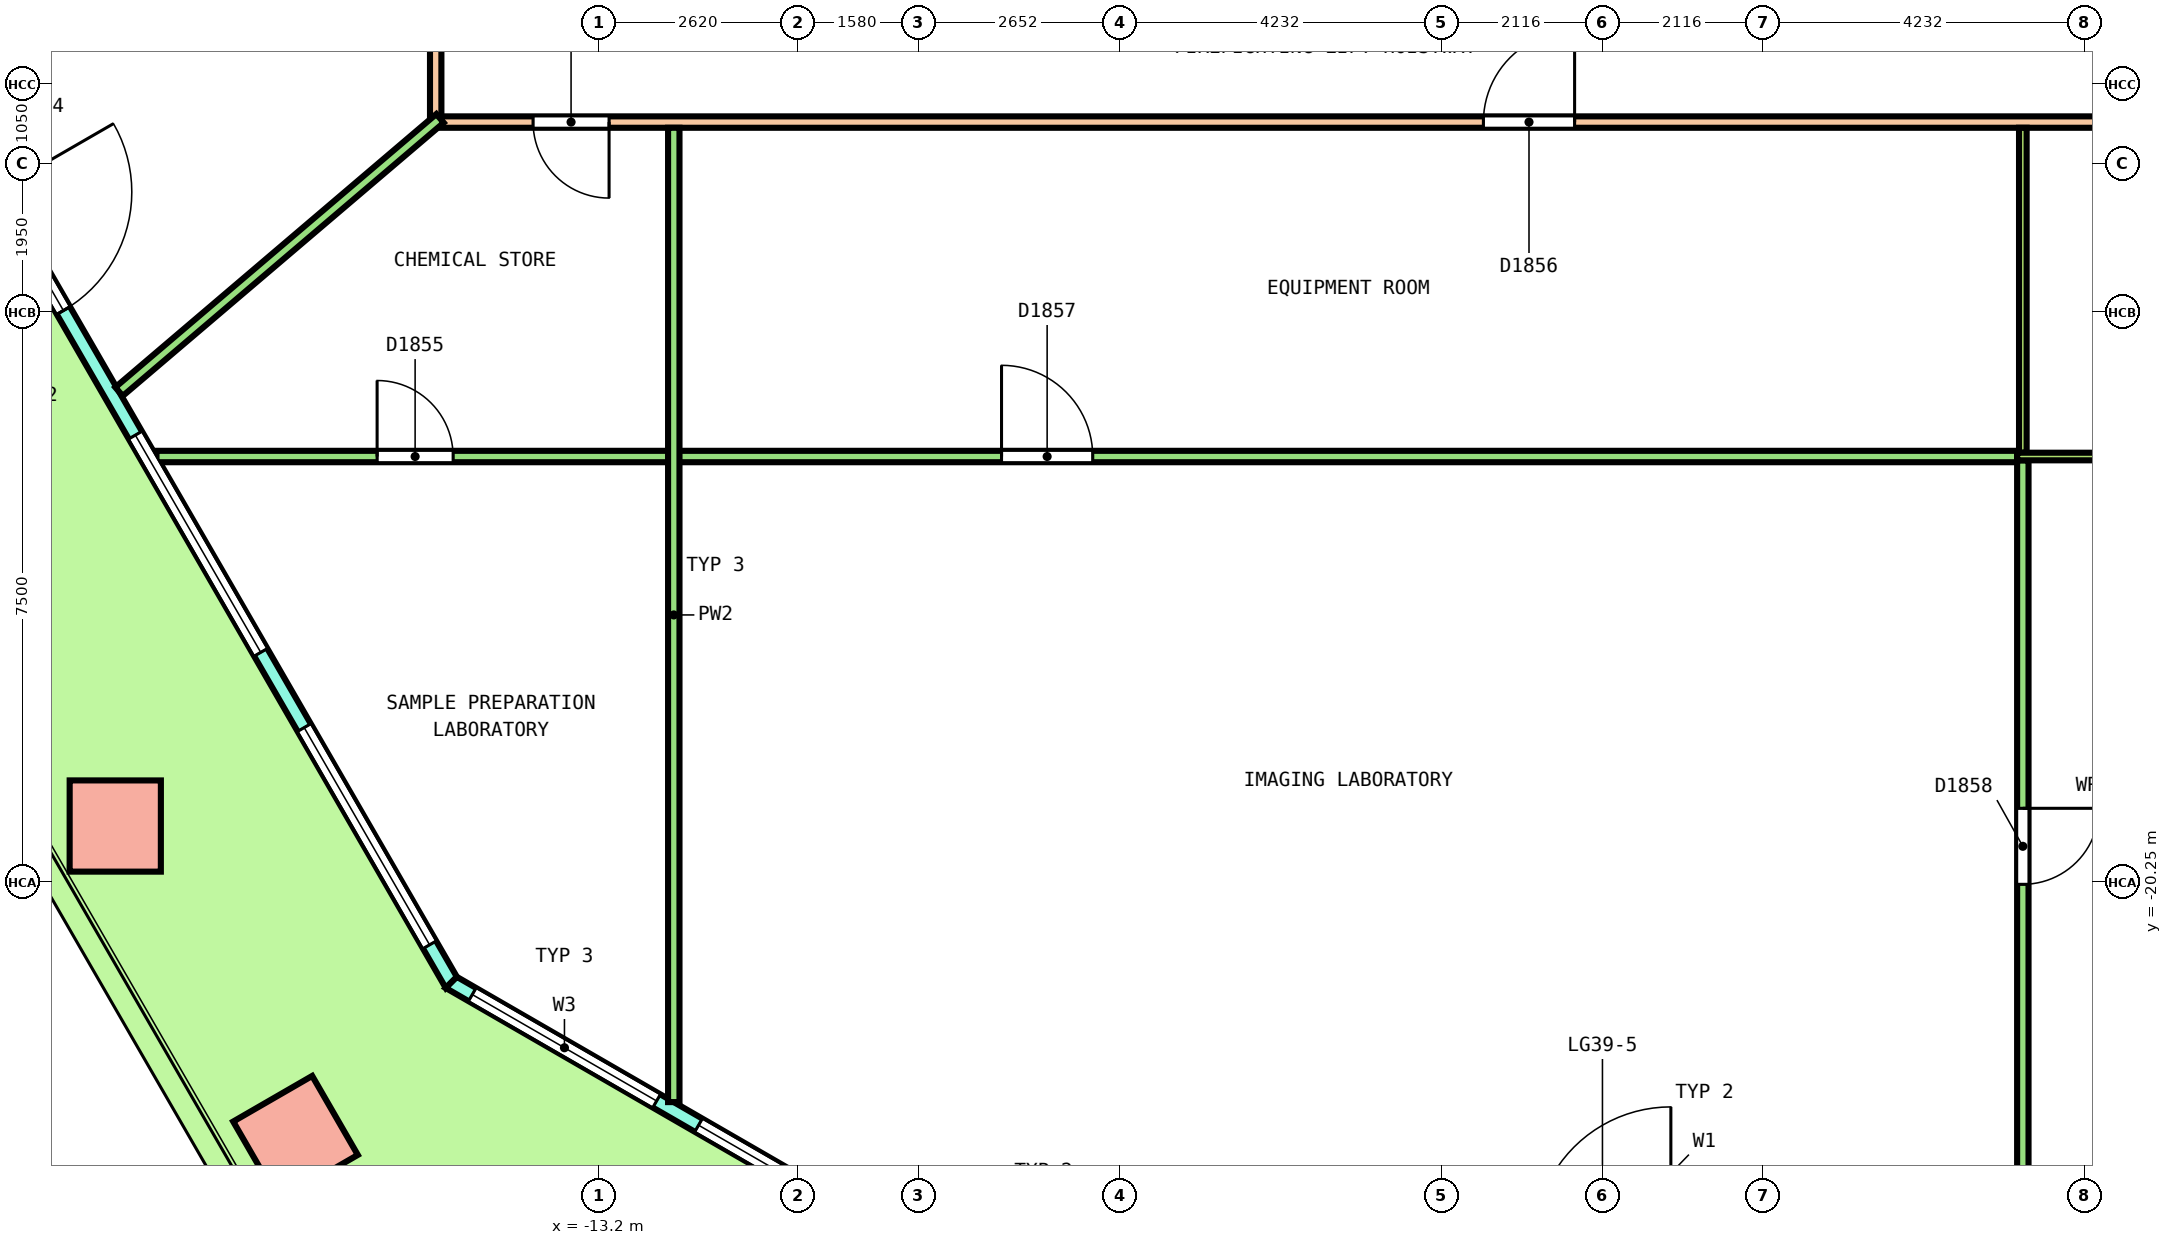
"""IFC4 building model, lengths in metres.
Left out: names, types, materials, properties, quantities, classifications, styles, units other than length and angle.
Written with IfcOpenShell. Run it as: python <this file> out.ifc"""

import sys

from ifc_helpers import new_model, si_unit, direction, frame, frame_2d, origin, origin_2d, place, context, subcontext, project, spatial, polyline, rectangle, outline, extrude, element, fill, save


model = new_model("IFC4")
c1 = context("Model", 3, precision=1e-05, world=origin(), true_north=direction((0.0, 1.0)))
c2 = subcontext(c1, "Body", "Model", "MODEL_VIEW")
j1 = project(units=[si_unit("LENGTHUNIT", "METRE"), si_unit("PLANEANGLEUNIT", "RADIAN")], contexts=[c1])
p1 = place(None, origin())
s1 = spatial("IfcSite", under=j1, at=p1, CompositionType="ELEMENT")
p2 = place(p1, origin())
s2 = spatial("IfcBuilding", under=s1, at=p2, CompositionType="ELEMENT")
p3 = place(p2, frame((0.0, 0.0, 180.4)))
s3 = spatial("IfcBuildingStorey", under=s2, at=p3, CompositionType="ELEMENT", Elevation=180.4)
p4 = place(p3, frame((-19.566, -19.511, 0.0), z_axis=(0.010908266268, -0.018803199313, 0.999763696792), x_axis=(0.501388074159, -0.864949390756, -0.021738227219)))
e1 = element("IfcColumn", 1, at=p4, inside=s3, PredefinedType="COLUMN", context=c2, shape_type="SweptSolid", body=[
    extrude(rectangle(XDim=1.2, YDim=1.2, at=origin_2d()), origin(), (0.0, 0.0, 1.0), 4.051),
])
p5 = place(p3, frame((-17.194, -23.619, 0.0), z_axis=(0.018132630042, -0.031385715123, 0.999342856388), x_axis=(0.865884970752, -0.499257274245, -0.031390946777)))
e2 = element("IfcColumn", 2, at=p5, inside=s3, PredefinedType="COLUMN", context=c2, shape_type="SweptSolid", body=[
    extrude(rectangle(XDim=1.2, YDim=1.2, at=origin_2d()), origin(), (0.0, 0.0, 1.0), 4.053),
])
p6 = place(p3, frame((-26.251, -2.331, 0.0), z_axis=(0.0, 0.0, 1.0), x_axis=(0.499999616612, -0.866025625133, 0.0)))
e3 = element("IfcWall", 3, at=p6, inside=s3, PredefinedType="SOLIDWALL", context=c2, shape_type="SweptSolid", body=[
    extrude(outline(polyline([(-0.027, -0.1), (0.985, -0.1), (1.998, -0.1), (3.01, -0.1), (4.022, -0.1), (5.034, -0.1), (6.046, -0.1), (7.058, -0.1), (8.071, -0.1), (9.083, -0.1), (10.095, -0.1), (11.107, -0.1), (12.119, -0.1), (13.131, -0.1), (14.143, -0.1), (15.156, -0.1), (16.168, -0.1), (17.18, -0.1), (18.192, -0.1), (19.204, -0.1), (20.216, -0.1), (21.229, -0.1), (22.241, -0.1), (22.187, 0.1), (21.18, 0.1), (20.172, 0.1), (19.165, 0.1), (18.158, 0.1), (17.151, 0.1), (16.143, 0.1), (15.136, 0.1), (14.129, 0.1), (13.122, 0.1), (12.114, 0.1), (11.107, 0.1), (10.1, 0.1), (9.092, 0.1), (8.085, 0.1), (7.078, 0.1), (6.071, 0.1), (5.063, 0.1), (4.056, 0.1), (3.049, 0.1), (2.042, 0.1), (1.034, 0.1), (0.027, 0.1), (-0.027, -0.1)])), origin(), (0.0, 0.0, 1.0), 4.1),
])
p7 = place(p6, frame((0.571, 0.0, 0.1)))
e4 = element("IfcOpeningElement", 4, at=p7, cuts=e3, PredefinedType="OPENING", context=c2, shape_type="SweptSolid", body=[
    extrude(rectangle(XDim=3.3, YDim=2.9, at=frame_2d((1.65, 1.45))), frame((0.0, 0.11, 0.0), z_axis=(0.0, -1.0, 0.0), x_axis=(1.0, 0.0, 0.0)), (0.0, 0.0, 1.0), 0.22),
])
p8 = place(p6, frame((5.014, 0.0, 0.1)))
e5 = element("IfcOpeningElement", 5, at=p8, cuts=e3, PredefinedType="OPENING", context=c2, shape_type="SweptSolid", body=[
    extrude(rectangle(XDim=3.3, YDim=2.9, at=frame_2d((1.65, 1.45))), frame((0.0, 0.11, 0.0), z_axis=(0.0, -1.0, 0.0), x_axis=(1.0, 0.0, 0.0)), (0.0, 0.0, 1.0), 0.22),
])
p9 = place(p6, frame((10.207, 0.0, 0.0)))
e6 = element("IfcOpeningElement", 6, at=p9, cuts=e3, PredefinedType="OPENING", context=c2, shape_type="SweptSolid", body=[
    extrude(rectangle(XDim=1.8, YDim=2.4, at=frame_2d((0.9, 1.2))), frame((0.0, 0.11, 0.0), z_axis=(0.0, -1.0, 0.0), x_axis=(1.0, 0.0, 0.0)), (0.0, 0.0, 1.0), 0.22),
])
p10 = place(p6, frame((10.207, 0.0, 2.55)))
e7 = element("IfcOpeningElement", 7, at=p10, cuts=e3, PredefinedType="OPENING", context=c2, shape_type="SweptSolid", body=[
    extrude(rectangle(XDim=1.8, YDim=0.45, at=frame_2d((0.9, 0.225))), frame((0.0, 0.11, 0.0), z_axis=(0.0, -1.0, 0.0), x_axis=(1.0, 0.0, 0.0)), (0.0, 0.0, 1.0), 0.22),
])
p11 = place(p6, frame((13.9, 0.0, 0.1)))
e8 = element("IfcOpeningElement", 8, at=p11, cuts=e3, PredefinedType="OPENING", context=c2, shape_type="SweptSolid", body=[
    extrude(rectangle(XDim=3.3, YDim=2.9, at=frame_2d((1.65, 1.45))), frame((0.0, 0.11, 0.0), z_axis=(0.0, -1.0, 0.0), x_axis=(1.0, 0.0, 0.0)), (0.0, 0.0, 1.0), 0.22),
])
p12 = place(p6, frame((18.343, 0.0, 0.1)))
e9 = element("IfcOpeningElement", 9, at=p12, cuts=e3, PredefinedType="OPENING", context=c2, shape_type="SweptSolid", body=[
    extrude(rectangle(XDim=3.3, YDim=2.9, at=frame_2d((1.65, 1.45))), frame((0.0, 0.11, 0.0), z_axis=(0.0, -1.0, 0.0), x_axis=(1.0, 0.0, 0.0)), (0.0, 0.0, 1.0), 0.22),
])
p13 = place(p3, frame((-15.145, -21.569, 0.0), z_axis=(0.0, 0.0, 1.0), x_axis=(0.866029458321, -0.49999297727, 0.0)))
e10 = element("IfcWall", 10, at=p13, inside=s3, PredefinedType="SOLIDWALL", context=c2, shape_type="SweptSolid", body=[
    extrude(outline(polyline([(-0.027, -0.1), (1.128, -0.1), (2.282, -0.1), (3.437, -0.1), (4.592, -0.1), (5.747, -0.1), (6.901, -0.1), (6.848, 0.1), (5.711, 0.1), (4.574, 0.1), (3.437, 0.1), (2.301, 0.1), (1.164, 0.1), (0.027, 0.1), (-0.027, -0.1)])), origin(), (0.0, 0.0, 1.0), 4.1),
])
p14 = place(p13, frame((0.319, 0.0, 0.1)))
e11 = element("IfcOpeningElement", 11, at=p14, cuts=e10, PredefinedType="OPENING", context=c2, shape_type="SweptSolid", body=[
    extrude(rectangle(XDim=2.8, YDim=2.9, at=frame_2d((1.4, 1.45))), frame((0.0, 0.11, 0.0), z_axis=(0.0, -1.0, 0.0), x_axis=(1.0, 0.0, 0.0)), (0.0, 0.0, 1.0), 0.22),
])
p15 = place(p13, frame((3.756, 0.0, 0.1)))
e12 = element("IfcOpeningElement", 12, at=p15, cuts=e10, PredefinedType="OPENING", context=c2, shape_type="SweptSolid", body=[
    extrude(rectangle(XDim=2.8, YDim=2.9, at=frame_2d((1.4, 1.45))), frame((0.0, 0.11, 0.0), z_axis=(0.0, -1.0, 0.0), x_axis=(1.0, 0.0, 0.0)), (0.0, 0.0, 1.0), 0.22),
])
p16 = place(p3, frame((-15.35, -10.175, 0.0), z_axis=(0.0, 0.0, 1.0), x_axis=(0.0, 1.0, 0.0)))
e13 = element("IfcWall", 13, at=p16, inside=s3, PredefinedType="PARTITIONING", context=c2, shape_type="SweptSolid", body=[
    extrude(rectangle(XDim=8.524, YDim=0.15, at=frame_2d((4.262, 0.0))), origin(), (0.0, 0.0, 1.0), 3.05),
])
p17 = place(p3, frame((-15.275, -10.25, 0.0), z_axis=(0.0, 0.0, 1.0), x_axis=(1.0, 0.0, 0.0)))
e14 = element("IfcWall", 14, at=p17, inside=s3, PredefinedType="PARTITIONING", context=c2, shape_type="SweptSolid", body=[
    extrude(rectangle(XDim=30.575, YDim=0.15, at=frame_2d((15.288, 0.0))), origin(), (0.0, 0.0, 1.0), 3.05),
])
p18 = place(p17, frame((1.206, 0.0, 0.0)))
e15 = element("IfcOpeningElement", 15, at=p18, cuts=e14, PredefinedType="OPENING", context=c2, shape_type="SweptSolid", body=[
    extrude(rectangle(XDim=1.0, YDim=2.1, at=frame_2d((0.5, 1.05))), frame((0.0, 0.085, 0.0), z_axis=(0.0, -1.0, 0.0), x_axis=(1.0, 0.0, 0.0)), (0.0, 0.0, 1.0), 0.17),
])
p19 = place(p17, frame((13.709, 0.0, 0.0)))
e16 = element("IfcOpeningElement", 16, at=p19, cuts=e14, PredefinedType="OPENING", context=c2, shape_type="SweptSolid", body=[
    extrude(rectangle(XDim=1.2, YDim=2.1, at=frame_2d((0.6, 1.05))), frame((0.0, 0.085, 0.0), z_axis=(0.0, -1.0, 0.0), x_axis=(1.0, 0.0, 0.0)), (0.0, 0.0, 1.0), 0.17),
])
p20 = place(p17, frame((22.447, 0.0, 0.0)))
e17 = element("IfcOpeningElement", 17, at=p20, cuts=e14, PredefinedType="OPENING", context=c2, shape_type="SweptSolid", body=[
    extrude(rectangle(XDim=1.0, YDim=2.1, at=frame_2d((0.5, 1.05))), frame((0.0, 0.085, 0.0), z_axis=(0.0, -1.0, 0.0), x_axis=(1.0, 0.0, 0.0)), (0.0, 0.0, 1.0), 0.17),
])
p21 = place(p17, frame((28.167, 0.0, 0.0)))
e18 = element("IfcOpeningElement", 18, at=p21, cuts=e14, PredefinedType="OPENING", context=c2, shape_type="SweptSolid", body=[
    extrude(rectangle(XDim=1.0, YDim=2.1, at=frame_2d((0.5, 1.05))), frame((0.0, 0.085, 0.0), z_axis=(0.0, -1.0, 0.0), x_axis=(1.0, 0.0, 0.0)), (0.0, 0.0, 1.0), 0.17),
])
p22 = place(p3, frame((-19.516, -13.797, 0.0), z_axis=(0.0, 0.0, 1.0), x_axis=(0.761464499981, 0.648206614644, 0.0)))
e19 = element("IfcWall", 19, at=p22, inside=s3, PredefinedType="PARTITIONING", context=c2, shape_type="SweptSolid", body=[
    extrude(rectangle(XDim=5.546, YDim=0.15, at=frame_2d((2.773, 0.0))), origin(), (0.0, 0.0, 1.0), 3.05),
])
p23 = place(p3, frame((-19.024, -14.65, 0.0), z_axis=(0.0, 0.0, 1.0), x_axis=(1.0, 0.0, 0.0)))
e20 = element("IfcWall", 20, at=p23, inside=s3, PredefinedType="PARTITIONING", context=c2, shape_type="SweptSolid", body=[
    extrude(rectangle(XDim=24.479, YDim=0.15, at=frame_2d((12.24, 0.0))), origin(), (0.0, 0.0, 1.0), 3.05),
])
p24 = place(p23, frame((2.903, 0.0, 0.0)))
e21 = element("IfcOpeningElement", 21, at=p24, cuts=e20, PredefinedType="OPENING", context=c2, shape_type="SweptSolid", body=[
    extrude(rectangle(XDim=1.0, YDim=2.1, at=frame_2d((0.5, 1.05))), frame((0.0, 0.085, 0.0), z_axis=(0.0, -1.0, 0.0), x_axis=(1.0, 0.0, 0.0)), (0.0, 0.0, 1.0), 0.17),
])
p25 = place(p23, frame((11.118, 0.0, 0.0)))
e22 = element("IfcOpeningElement", 22, at=p25, cuts=e20, PredefinedType="OPENING", context=c2, shape_type="SweptSolid", body=[
    extrude(rectangle(XDim=1.2, YDim=2.1, at=frame_2d((0.6, 1.05))), frame((0.0, 0.085, 0.0), z_axis=(0.0, -1.0, 0.0), x_axis=(1.0, 0.0, 0.0)), (0.0, 0.0, 1.0), 0.17),
])
p26 = place(p3, frame((-12.218, -23.143, 0.0), z_axis=(0.0, 0.0, 1.0), x_axis=(0.0, 1.0, 0.0)))
e23 = element("IfcWall", 23, at=p26, inside=s3, PredefinedType="PARTITIONING", context=c2, shape_type="SweptSolid", body=[
    extrude(rectangle(XDim=12.818, YDim=0.15, at=frame_2d((6.409, 0.0))), origin(), (0.0, 0.0, 1.0), 3.05),
])
p27 = place(p3, frame((5.531, -24.906, 0.0), z_axis=(0.0, 0.0, 1.0), x_axis=(0.0, 1.0, 0.0)))
e24 = element("IfcWall", 24, at=p27, inside=s3, PredefinedType="PARTITIONING", context=c2, shape_type="SweptSolid", body=[
    extrude(rectangle(XDim=10.206, YDim=0.15, at=frame_2d((5.103, 0.0))), origin(), (0.0, 0.0, 1.0), 3.05),
])
p28 = place(p27, frame((4.628, 0.0, 0.0)))
e25 = element("IfcOpeningElement", 25, at=p28, cuts=e24, PredefinedType="OPENING", context=c2, shape_type="SweptSolid", body=[
    extrude(rectangle(XDim=1.0, YDim=2.1, at=frame_2d((0.5, 1.05))), frame((0.0, 0.085, 0.0), z_axis=(0.0, -1.0, 0.0), x_axis=(1.0, 0.0, 0.0)), (0.0, 0.0, 1.0), 0.17),
])
p29 = place(p3, frame((5.531, -14.6, 0.0), z_axis=(0.0, 0.0, 1.0), x_axis=(0.0, 1.0, 0.0)))
e26 = element("IfcWall", 26, at=p29, inside=s3, PredefinedType="PARTITIONING", context=c2, shape_type="SweptSolid", body=[
    extrude(rectangle(XDim=4.275, YDim=0.1, at=frame_2d((2.138, 0.0))), origin(), (0.0, 0.0, 1.0), 3.05),
])
p30 = place(p3, frame((5.456, -14.65, 0.0), z_axis=(0.0, 0.0, 1.0), x_axis=(1.0, 0.0, 0.0)))
e27 = element("IfcWall", 27, at=p30, inside=s3, PredefinedType="PARTITIONING", context=c2, shape_type="SweptSolid", body=[
    extrude(rectangle(XDim=3.712, YDim=0.1, at=frame_2d((1.856, 0.0))), origin(), (0.0, 0.0, 1.0), 3.05),
])
p31 = place(p9, origin())
e28 = element("IfcDoor", 28, at=p31, inside=s3, OperationType="DOUBLE_DOOR_SINGLE_SWING", PredefinedType="DOOR", context=c2, shape_type="SweptSolid", body=[
    extrude(rectangle(XDim=1.8, YDim=2.4, at=frame_2d((0.9, 1.2))), frame((0.0, 0.025, 0.0), z_axis=(0.0, -1.0, 0.0), x_axis=(1.0, 0.0, 0.0)), (0.0, 0.0, 1.0), 0.05),
])
fill(e6, e28)
p32 = place(p10, origin())
e29 = element("IfcWindow", 29, at=p32, inside=s3, PartitioningType="SINGLE_PANEL", PredefinedType="WINDOW", context=c2, shape_type="SweptSolid", body=[
    extrude(rectangle(XDim=1.8, YDim=0.45, at=frame_2d((0.9, 0.225))), frame((0.0, 0.03, 0.0), z_axis=(0.0, -1.0, 0.0), x_axis=(1.0, 0.0, 0.0)), (0.0, 0.0, 1.0), 0.06),
])
fill(e7, e29)
p33 = place(p11, origin())
e30 = element("IfcWindow", 30, at=p33, inside=s3, PartitioningType="SINGLE_PANEL", PredefinedType="WINDOW", context=c2, shape_type="SweptSolid", body=[
    extrude(rectangle(XDim=3.3, YDim=2.9, at=frame_2d((1.65, 1.45))), frame((0.0, 0.03, 0.0), z_axis=(0.0, -1.0, 0.0), x_axis=(1.0, 0.0, 0.0)), (0.0, 0.0, 1.0), 0.06),
])
fill(e8, e30)
p34 = place(p12, origin())
e31 = element("IfcWindow", 31, at=p34, inside=s3, PartitioningType="SINGLE_PANEL", PredefinedType="WINDOW", context=c2, shape_type="SweptSolid", body=[
    extrude(rectangle(XDim=3.3, YDim=2.9, at=frame_2d((1.65, 1.45))), frame((0.0, 0.03, 0.0), z_axis=(0.0, -1.0, 0.0), x_axis=(1.0, 0.0, 0.0)), (0.0, 0.0, 1.0), 0.06),
])
fill(e9, e31)
p35 = place(p14, origin())
e32 = element("IfcWindow", 32, at=p35, inside=s3, PartitioningType="SINGLE_PANEL", PredefinedType="WINDOW", context=c2, shape_type="SweptSolid", body=[
    extrude(rectangle(XDim=2.8, YDim=2.9, at=frame_2d((1.4, 1.45))), frame((0.0, 0.03, 0.0), z_axis=(0.0, -1.0, 0.0), x_axis=(1.0, 0.0, 0.0)), (0.0, 0.0, 1.0), 0.06),
])
fill(e11, e32)
p36 = place(p15, origin())
e33 = element("IfcWindow", 33, at=p36, inside=s3, PartitioningType="SINGLE_PANEL", PredefinedType="WINDOW", context=c2, shape_type="SweptSolid", body=[
    extrude(rectangle(XDim=2.8, YDim=2.9, at=frame_2d((1.4, 1.45))), frame((0.0, 0.03, 0.0), z_axis=(0.0, -1.0, 0.0), x_axis=(1.0, 0.0, 0.0)), (0.0, 0.0, 1.0), 0.06),
])
fill(e12, e33)
p37 = place(p18, origin())
e34 = element("IfcDoor", 34, at=p37, inside=s3, OperationType="SINGLE_SWING_LEFT", PredefinedType="DOOR", context=c2, shape_type="SweptSolid", body=[
    extrude(rectangle(XDim=1.0, YDim=2.1, at=frame_2d((0.5, 1.05))), frame((0.0, 0.025, 0.0), z_axis=(0.0, -1.0, 0.0), x_axis=(1.0, 0.0, 0.0)), (0.0, 0.0, 1.0), 0.05),
])
fill(e15, e34)
p38 = place(p24, origin())
e35 = element("IfcDoor", 35, at=p38, inside=s3, OperationType="SINGLE_SWING_RIGHT", PredefinedType="DOOR", context=c2, shape_type="SweptSolid", body=[
    extrude(rectangle(XDim=1.0, YDim=2.1, at=frame_2d((0.5, 1.05))), frame((0.0, 0.025, 0.0), z_axis=(0.0, -1.0, 0.0), x_axis=(1.0, 0.0, 0.0)), (0.0, 0.0, 1.0), 0.05),
])
fill(e21, e35)
p39 = place(p19, origin())
e36 = element("IfcDoor", 36, at=p39, inside=s3, OperationType="DOUBLE_DOOR_SINGLE_SWING", PredefinedType="DOOR", context=c2, shape_type="SweptSolid", body=[
    extrude(rectangle(XDim=1.2, YDim=2.1, at=frame_2d((0.6, 1.05))), frame((0.0, 0.025, 0.0), z_axis=(0.0, -1.0, 0.0), x_axis=(1.0, 0.0, 0.0)), (0.0, 0.0, 1.0), 0.05),
])
fill(e16, e36)
p40 = place(p25, origin())
e37 = element("IfcDoor", 37, at=p40, inside=s3, OperationType="DOUBLE_DOOR_SINGLE_SWING", PredefinedType="DOOR", context=c2, shape_type="SweptSolid", body=[
    extrude(rectangle(XDim=1.2, YDim=2.1, at=frame_2d((0.6, 1.05))), frame((0.0, 0.025, 0.0), z_axis=(0.0, -1.0, 0.0), x_axis=(1.0, 0.0, 0.0)), (0.0, 0.0, 1.0), 0.05),
])
fill(e22, e37)
p41 = place(p28, origin())
e38 = element("IfcDoor", 38, at=p41, inside=s3, OperationType="SINGLE_SWING_RIGHT", PredefinedType="DOOR", context=c2, shape_type="SweptSolid", body=[
    extrude(rectangle(XDim=1.0, YDim=2.1, at=frame_2d((0.5, 1.05))), frame((0.0, 0.025, 0.0), z_axis=(0.0, -1.0, 0.0), x_axis=(1.0, 0.0, 0.0)), (0.0, 0.0, 1.0), 0.05),
])
fill(e25, e38)
save(model, sys.argv[1])
